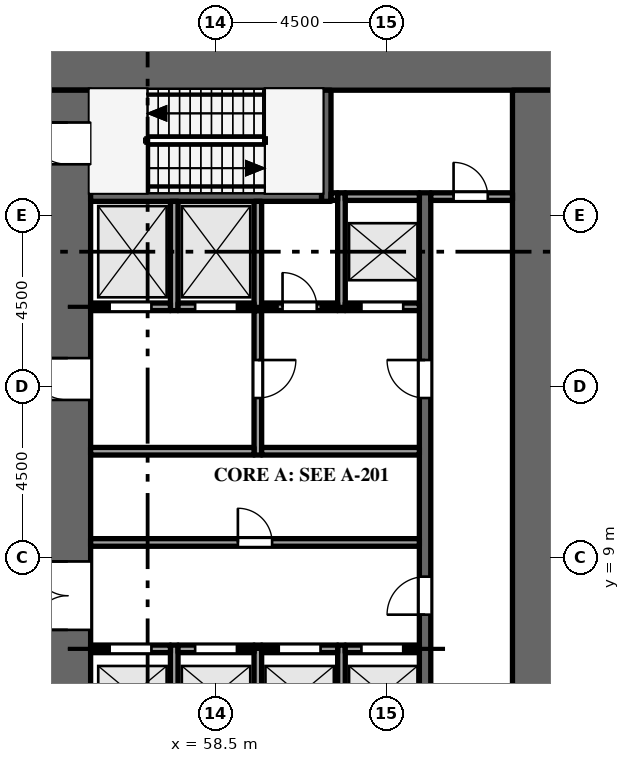
"""IFC4 building model, lengths in metres.
Left out: names, types, materials, properties, quantities, classifications, styles, units other than length and angle.
Written with IfcOpenShell. Run it as: python <this file> out.ifc"""

import sys

from ifc_helpers import new_model, si_unit, direction, frame, frame_2d, origin, place, context, subcontext, project, spatial, rectangle, extrude, element, fill, save


model = new_model("IFC4")
c1 = context("Model", 3, precision=1e-05, world=origin(), true_north=direction((0.0, 1.0)))
c2 = subcontext(c1, "Body", "Model", "MODEL_VIEW")
j1 = project(units=[si_unit("LENGTHUNIT", "METRE"), si_unit("PLANEANGLEUNIT", "RADIAN")], contexts=[c1])
p1 = place(None, origin())
s1 = spatial("IfcSite", under=j1, at=p1, CompositionType="ELEMENT")
p2 = place(p1, origin())
s2 = spatial("IfcBuilding", under=s1, at=p2, CompositionType="ELEMENT")
p3 = place(p2, origin())
s3 = spatial("IfcBuildingStorey", under=s2, at=p3, CompositionType="ELEMENT", Elevation=0.0)
p4 = place(p3, frame((54.0, 21.9, -0.3), z_axis=(0.0, 0.0, 1.0), x_axis=(1.0, 0.0, 0.0)))
e1 = element("IfcWall", 1, at=p4, inside=s3, PredefinedType="SHEAR", context=c2, shape_type="SweptSolid", body=[
    extrude(rectangle(XDim=13.5, YDim=1.2, at=frame_2d((6.75, 0.0))), origin(), (0.0, 0.0, 1.0), 8.15),
])
p5 = place(p3, frame((54.6, 1.2, -0.3), z_axis=(0.0, 0.0, 1.0), x_axis=(0.0, 1.0, 0.0)))
e2 = element("IfcWall", 2, at=p5, inside=s3, PredefinedType="SHEAR", context=c2, shape_type="SweptSolid", body=[
    extrude(rectangle(XDim=20.1, YDim=1.2, at=frame_2d((10.05, 0.0))), origin(), (0.0, 0.0, 1.0), 8.15),
])
p6 = place(p5, frame((5.9, 0.0, 0.3)))
e3 = element("IfcOpeningElement", 3, at=p6, cuts=e2, PredefinedType="OPENING", context=c2, shape_type="SweptSolid", body=[
    extrude(rectangle(XDim=1.8, YDim=2.1, at=frame_2d((0.9, 1.05))), frame((0.0, 0.61, 0.0), z_axis=(0.0, -1.0, 0.0), x_axis=(1.0, 0.0, 0.0)), (0.0, 0.0, 1.0), 1.22),
])
p7 = place(p5, frame((11.95, 0.0, 0.3)))
e4 = element("IfcOpeningElement", 4, at=p7, cuts=e2, PredefinedType="OPENING", context=c2, shape_type="SweptSolid", body=[
    extrude(rectangle(XDim=1.1, YDim=2.1, at=frame_2d((0.55, 1.05))), frame((0.0, 0.61, 0.0), z_axis=(0.0, -1.0, 0.0), x_axis=(1.0, 0.0, 0.0)), (0.0, 0.0, 1.0), 1.22),
])
p8 = place(p5, frame((0.95, 0.0, 0.3)))
e5 = element("IfcOpeningElement", 5, at=p8, cuts=e2, PredefinedType="OPENING", context=c2, shape_type="SweptSolid", body=[
    extrude(rectangle(XDim=1.1, YDim=2.1, at=frame_2d((0.55, 1.05))), frame((0.0, 0.61, 0.0), z_axis=(0.0, -1.0, 0.0), x_axis=(1.0, 0.0, 0.0)), (0.0, 0.0, 1.0), 1.22),
])
p9 = place(p5, frame((18.15, 0.0, 0.3)))
e6 = element("IfcOpeningElement", 6, at=p9, cuts=e2, PredefinedType="OPENING", context=c2, shape_type="SweptSolid", body=[
    extrude(rectangle(XDim=1.1, YDim=2.1, at=frame_2d((0.55, 1.05))), frame((0.0, 0.61, 0.0), z_axis=(0.0, -1.0, 0.0), x_axis=(1.0, 0.0, 0.0)), (0.0, 0.0, 1.0), 1.22),
])
p10 = place(p3, frame((66.9, 1.2, -0.3), z_axis=(0.0, 0.0, 1.0), x_axis=(0.0, 1.0, 0.0)))
e7 = element("IfcWall", 7, at=p10, inside=s3, PredefinedType="SHEAR", context=c2, shape_type="SweptSolid", body=[
    extrude(rectangle(XDim=20.1, YDim=1.2, at=frame_2d((10.05, 0.0))), origin(), (0.0, 0.0, 1.0), 8.15),
])
p11 = place(p3, frame((57.4, 4.325, 0.0), z_axis=(0.0, 0.0, 1.0), x_axis=(0.0, 1.0, 0.0)))
e8 = element("IfcWall", 8, at=p11, inside=s3, PredefinedType="SOLIDWALL", context=c2, shape_type="SweptSolid", body=[
    extrude(rectangle(XDim=2.375, YDim=0.2, at=frame_2d((1.188, 0.0))), origin(), (0.0, 0.0, 1.0), 7.75),
])
p12 = place(p3, frame((57.4, 15.5, 0.0), z_axis=(0.0, 0.0, 1.0), x_axis=(0.0, 1.0, 0.0)))
e9 = element("IfcWall", 9, at=p12, inside=s3, PredefinedType="SOLIDWALL", context=c2, shape_type="SweptSolid", body=[
    extrude(rectangle(XDim=2.875, YDim=0.2, at=frame_2d((1.438, 0.0))), origin(), (0.0, 0.0, 1.0), 7.75),
])
p13 = place(p3, frame((59.6, 4.325, 0.0), z_axis=(0.0, 0.0, 1.0), x_axis=(0.0, 1.0, 0.0)))
e10 = element("IfcWall", 10, at=p13, inside=s3, PredefinedType="SOLIDWALL", context=c2, shape_type="SweptSolid", body=[
    extrude(rectangle(XDim=2.375, YDim=0.2, at=frame_2d((1.188, 0.0))), origin(), (0.0, 0.0, 1.0), 7.75),
])
p14 = place(p3, frame((59.6, 11.7, 0.0), z_axis=(0.0, 0.0, 1.0), x_axis=(0.0, 1.0, 0.0)))
e11 = element("IfcWall", 11, at=p14, inside=s3, PredefinedType="PARTITIONING", context=c2, shape_type="SweptSolid", body=[
    extrude(rectangle(XDim=3.8, YDim=0.2, at=frame_2d((1.9, 0.0))), origin(), (0.0, 0.0, 1.0), 7.75),
])
p15 = place(p14, frame((1.5, 0.0, 0.0)))
e12 = element("IfcOpeningElement", 12, at=p15, cuts=e11, PredefinedType="OPENING", context=c2, shape_type="SweptSolid", body=[
    extrude(rectangle(XDim=1.0, YDim=2.1, at=frame_2d((0.5, 1.05))), frame((0.0, 0.11, 0.0), z_axis=(0.0, -1.0, 0.0), x_axis=(1.0, 0.0, 0.0)), (0.0, 0.0, 1.0), 0.22),
])
p16 = place(p3, frame((59.6, 15.5, 0.0), z_axis=(0.0, 0.0, 1.0), x_axis=(0.0, 1.0, 0.0)))
e13 = element("IfcWall", 13, at=p16, inside=s3, PredefinedType="SOLIDWALL", context=c2, shape_type="SweptSolid", body=[
    extrude(rectangle(XDim=2.875, YDim=0.2, at=frame_2d((1.438, 0.0))), origin(), (0.0, 0.0, 1.0), 7.75),
])
p17 = place(p3, frame((61.4, 18.375, 0.0), z_axis=(0.0, 0.0, 1.0), x_axis=(0.0, 1.0, 0.0)))
e14 = element("IfcWall", 14, at=p17, inside=s3, PredefinedType="SHEAR", context=c2, shape_type="SweptSolid", body=[
    extrude(rectangle(XDim=2.925, YDim=0.25, at=frame_2d((1.462, 0.0))), origin(), (0.0, 0.0, 1.0), 7.75),
])
p18 = place(p3, frame((61.8, 4.1, 0.0), z_axis=(0.0, 0.0, 1.0), x_axis=(0.0, 1.0, 0.0)))
e15 = element("IfcWall", 15, at=p18, inside=s3, PredefinedType="SOLIDWALL", context=c2, shape_type="SweptSolid", body=[
    extrude(rectangle(XDim=2.6, YDim=0.2, at=frame_2d((1.3, 0.0))), origin(), (0.0, 0.0, 1.0), 7.75),
])
p19 = place(p3, frame((61.8, 15.5, 0.0), z_axis=(0.0, 0.0, 1.0), x_axis=(0.0, 1.0, 0.0)))
e16 = element("IfcWall", 16, at=p19, inside=s3, PredefinedType="SOLIDWALL", context=c2, shape_type="SweptSolid", body=[
    extrude(rectangle(XDim=3.1, YDim=0.2, at=frame_2d((1.55, 0.0))), origin(), (0.0, 0.0, 1.0), 7.75),
])
p20 = place(p3, frame((64.0, 4.1, 0.0), z_axis=(0.0, 0.0, 1.0), x_axis=(0.0, 1.0, 0.0)))
e17 = element("IfcWall", 17, at=p20, inside=s3, PredefinedType="SHEAR", context=c2, shape_type="SweptSolid", body=[
    extrude(rectangle(XDim=14.5, YDim=0.3, at=frame_2d((7.25, 0.0))), origin(), (0.0, 0.0, 1.0), 7.75),
])
p21 = place(p20, frame((3.4, 0.0, 0.0)))
e18 = element("IfcOpeningElement", 18, at=p21, cuts=e17, PredefinedType="OPENING", context=c2, shape_type="SweptSolid", body=[
    extrude(rectangle(XDim=1.0, YDim=2.1, at=frame_2d((0.5, 1.05))), frame((0.0, 0.16, 0.0), z_axis=(0.0, -1.0, 0.0), x_axis=(1.0, 0.0, 0.0)), (0.0, 0.0, 1.0), 0.32),
])
p22 = place(p20, frame((9.1, 0.0, 0.0)))
e19 = element("IfcOpeningElement", 19, at=p22, cuts=e17, PredefinedType="OPENING", context=c2, shape_type="SweptSolid", body=[
    extrude(rectangle(XDim=1.0, YDim=2.1, at=frame_2d((0.5, 1.05))), frame((0.0, 0.16, 0.0), z_axis=(0.0, -1.0, 0.0), x_axis=(1.0, 0.0, 0.0)), (0.0, 0.0, 1.0), 0.32),
])
p23 = place(p3, frame((55.2, 6.6, 0.0), z_axis=(0.0, 0.0, 1.0), x_axis=(1.0, 0.0, 0.0)))
e20 = element("IfcWall", 20, at=p23, inside=s3, PredefinedType="SOLIDWALL", context=c2, shape_type="SweptSolid", body=[
    extrude(rectangle(XDim=2.1, YDim=0.2, at=frame_2d((1.05, 0.0))), origin(), (0.0, 0.0, 1.0), 7.75),
])
p24 = place(p23, frame((0.5, 0.0, 0.012)))
e21 = element("IfcOpeningElement", 21, at=p24, cuts=e20, PredefinedType="OPENING", context=c2, shape_type="SweptSolid", body=[
    extrude(rectangle(XDim=1.1, YDim=2.1, at=frame_2d((0.55, 1.05))), frame((0.0, 0.11, 0.0), z_axis=(0.0, -1.0, 0.0), x_axis=(1.0, 0.0, 0.0)), (0.0, 0.0, 1.0), 0.22),
])
p25 = place(p3, frame((57.5, 6.6, 0.0), z_axis=(0.0, 0.0, 1.0), x_axis=(1.0, 0.0, 0.0)))
e22 = element("IfcWall", 22, at=p25, inside=s3, PredefinedType="SOLIDWALL", context=c2, shape_type="SweptSolid", body=[
    extrude(rectangle(XDim=2.0, YDim=0.2, at=frame_2d((1.0, 0.0))), origin(), (0.0, 0.0, 1.0), 7.75),
])
p26 = place(p25, frame((0.45, 0.0, 0.012)))
e23 = element("IfcOpeningElement", 23, at=p26, cuts=e22, PredefinedType="OPENING", context=c2, shape_type="SweptSolid", body=[
    extrude(rectangle(XDim=1.1, YDim=2.1, at=frame_2d((0.55, 1.05))), frame((0.0, 0.11, 0.0), z_axis=(0.0, -1.0, 0.0), x_axis=(1.0, 0.0, 0.0)), (0.0, 0.0, 1.0), 0.22),
])
p27 = place(p3, frame((59.7, 6.6, 0.0), z_axis=(0.0, 0.0, 1.0), x_axis=(1.0, 0.0, 0.0)))
e24 = element("IfcWall", 24, at=p27, inside=s3, PredefinedType="SOLIDWALL", context=c2, shape_type="SweptSolid", body=[
    extrude(rectangle(XDim=2.0, YDim=0.2, at=frame_2d((1.0, 0.0))), origin(), (0.0, 0.0, 1.0), 7.75),
])
p28 = place(p27, frame((0.45, 0.0, 0.012)))
e25 = element("IfcOpeningElement", 25, at=p28, cuts=e24, PredefinedType="OPENING", context=c2, shape_type="SweptSolid", body=[
    extrude(rectangle(XDim=1.1, YDim=2.1, at=frame_2d((0.55, 1.05))), frame((0.0, 0.11, 0.0), z_axis=(0.0, -1.0, 0.0), x_axis=(1.0, 0.0, 0.0)), (0.0, 0.0, 1.0), 0.22),
])
p29 = place(p3, frame((61.9, 6.6, 0.0), z_axis=(0.0, 0.0, 1.0), x_axis=(1.0, 0.0, 0.0)))
e26 = element("IfcWall", 26, at=p29, inside=s3, PredefinedType="SOLIDWALL", context=c2, shape_type="SweptSolid", body=[
    extrude(rectangle(XDim=1.95, YDim=0.2, at=frame_2d((0.975, 0.0))), origin(), (0.0, 0.0, 1.0), 7.75),
])
p30 = place(p29, frame((0.425, 0.0, 0.012)))
e27 = element("IfcOpeningElement", 27, at=p30, cuts=e26, PredefinedType="OPENING", context=c2, shape_type="SweptSolid", body=[
    extrude(rectangle(XDim=1.1, YDim=2.1, at=frame_2d((0.55, 1.05))), frame((0.0, 0.11, 0.0), z_axis=(0.0, -1.0, 0.0), x_axis=(1.0, 0.0, 0.0)), (0.0, 0.0, 1.0), 0.22),
])
p31 = place(p3, frame((55.2, 9.4, 0.0), z_axis=(0.0, 0.0, 1.0), x_axis=(1.0, 0.0, 0.0)))
e28 = element("IfcWall", 28, at=p31, inside=s3, PredefinedType="PARTITIONING", context=c2, shape_type="SweptSolid", body=[
    extrude(rectangle(XDim=8.65, YDim=0.2, at=frame_2d((4.325, 0.0))), origin(), (0.0, 0.0, 1.0), 7.75),
])
p32 = place(p31, frame((3.875, 0.0, 0.0)))
e29 = element("IfcOpeningElement", 29, at=p32, cuts=e28, PredefinedType="OPENING", context=c2, shape_type="SweptSolid", body=[
    extrude(rectangle(XDim=0.9, YDim=2.1, at=frame_2d((0.45, 1.05))), frame((0.0, 0.11, 0.0), z_axis=(0.0, -1.0, 0.0), x_axis=(1.0, 0.0, 0.0)), (0.0, 0.0, 1.0), 0.22),
])
p33 = place(p3, frame((55.2, 11.8, 0.0), z_axis=(0.0, 0.0, 1.0), x_axis=(1.0, 0.0, 0.0)))
e30 = element("IfcWall", 30, at=p33, inside=s3, PredefinedType="PARTITIONING", context=c2, shape_type="SweptSolid", body=[
    extrude(rectangle(XDim=4.3, YDim=0.2, at=frame_2d((2.15, 0.0))), origin(), (0.0, 0.0, 1.0), 7.75),
])
p34 = place(p3, frame((59.7, 11.8, 0.0), z_axis=(0.0, 0.0, 1.0), x_axis=(1.0, 0.0, 0.0)))
e31 = element("IfcWall", 31, at=p34, inside=s3, PredefinedType="PARTITIONING", context=c2, shape_type="SweptSolid", body=[
    extrude(rectangle(XDim=4.15, YDim=0.2, at=frame_2d((2.075, 0.0))), origin(), (0.0, 0.0, 1.0), 7.75),
])
p35 = place(p3, frame((55.2, 15.6, 0.0), z_axis=(0.0, 0.0, 1.0), x_axis=(1.0, 0.0, 0.0)))
e32 = element("IfcWall", 32, at=p35, inside=s3, PredefinedType="SOLIDWALL", context=c2, shape_type="SweptSolid", body=[
    extrude(rectangle(XDim=2.1, YDim=0.2, at=frame_2d((1.05, 0.0))), origin(), (0.0, 0.0, 1.0), 7.75),
])
p36 = place(p35, frame((0.5, 0.0, 0.012)))
e33 = element("IfcOpeningElement", 33, at=p36, cuts=e32, PredefinedType="OPENING", context=c2, shape_type="SweptSolid", body=[
    extrude(rectangle(XDim=1.1, YDim=2.1, at=frame_2d((0.55, 1.05))), frame((0.0, 0.11, 0.0), z_axis=(0.0, -1.0, 0.0), x_axis=(1.0, 0.0, 0.0)), (0.0, 0.0, 1.0), 0.22),
])
p37 = place(p3, frame((57.5, 15.6, 0.0), z_axis=(0.0, 0.0, 1.0), x_axis=(1.0, 0.0, 0.0)))
e34 = element("IfcWall", 34, at=p37, inside=s3, PredefinedType="SOLIDWALL", context=c2, shape_type="SweptSolid", body=[
    extrude(rectangle(XDim=2.0, YDim=0.2, at=frame_2d((1.0, 0.0))), origin(), (0.0, 0.0, 1.0), 7.75),
])
p38 = place(p37, frame((0.45, 0.0, 0.012)))
e35 = element("IfcOpeningElement", 35, at=p38, cuts=e34, PredefinedType="OPENING", context=c2, shape_type="SweptSolid", body=[
    extrude(rectangle(XDim=1.1, YDim=2.1, at=frame_2d((0.55, 1.05))), frame((0.0, 0.11, 0.0), z_axis=(0.0, -1.0, 0.0), x_axis=(1.0, 0.0, 0.0)), (0.0, 0.0, 1.0), 0.22),
])
p39 = place(p3, frame((59.7, 15.6, 0.0), z_axis=(0.0, 0.0, 1.0), x_axis=(1.0, 0.0, 0.0)))
e36 = element("IfcWall", 36, at=p39, inside=s3, PredefinedType="PARTITIONING", context=c2, shape_type="SweptSolid", body=[
    extrude(rectangle(XDim=2.0, YDim=0.2, at=frame_2d((1.0, 0.0))), origin(), (0.0, 0.0, 1.0), 7.75),
])
p40 = place(p39, frame((0.55, 0.0, 0.0)))
e37 = element("IfcOpeningElement", 37, at=p40, cuts=e36, PredefinedType="OPENING", context=c2, shape_type="SweptSolid", body=[
    extrude(rectangle(XDim=0.9, YDim=2.1, at=frame_2d((0.45, 1.05))), frame((0.0, 0.11, 0.0), z_axis=(0.0, -1.0, 0.0), x_axis=(1.0, 0.0, 0.0)), (0.0, 0.0, 1.0), 0.22),
])
p41 = place(p3, frame((61.9, 15.6, 0.0), z_axis=(0.0, 0.0, 1.0), x_axis=(1.0, 0.0, 0.0)))
e38 = element("IfcWall", 38, at=p41, inside=s3, PredefinedType="SOLIDWALL", context=c2, shape_type="SweptSolid", body=[
    extrude(rectangle(XDim=1.95, YDim=0.2, at=frame_2d((0.975, 0.0))), origin(), (0.0, 0.0, 1.0), 7.75),
])
p42 = place(p41, frame((0.425, 0.0, 0.012)))
e39 = element("IfcOpeningElement", 39, at=p42, cuts=e38, PredefinedType="OPENING", context=c2, shape_type="SweptSolid", body=[
    extrude(rectangle(XDim=1.1, YDim=2.1, at=frame_2d((0.55, 1.05))), frame((0.0, 0.11, 0.0), z_axis=(0.0, -1.0, 0.0), x_axis=(1.0, 0.0, 0.0)), (0.0, 0.0, 1.0), 0.22),
])
p43 = place(p3, frame((55.2, 18.5, 0.0), z_axis=(0.0, 0.0, 1.0), x_axis=(1.0, 0.0, 0.0)))
e40 = element("IfcWall", 40, at=p43, inside=s3, PredefinedType="SHEAR", context=c2, shape_type="SweptSolid", body=[
    extrude(rectangle(XDim=6.075, YDim=0.25, at=frame_2d((3.038, 0.0))), origin(), (0.0, 0.0, 1.0), 7.75),
])
p44 = place(p3, frame((61.525, 18.5, 0.0), z_axis=(0.0, 0.0, 1.0), x_axis=(1.0, 0.0, 0.0)))
e41 = element("IfcWall", 41, at=p44, inside=s3, PredefinedType="PARTITIONING", context=c2, shape_type="SweptSolid", body=[
    extrude(rectangle(XDim=0.175, YDim=0.2, at=frame_2d((0.087, 0.0))), origin(), (0.0, 0.0, 1.0), 7.75),
])
p45 = place(p3, frame((61.9, 18.5, 0.0), z_axis=(0.0, 0.0, 1.0), x_axis=(1.0, 0.0, 0.0)))
e42 = element("IfcWall", 42, at=p45, inside=s3, PredefinedType="SOLIDWALL", context=c2, shape_type="SweptSolid", body=[
    extrude(rectangle(XDim=1.95, YDim=0.2, at=frame_2d((0.975, 0.0))), origin(), (0.0, 0.0, 1.0), 7.75),
])
p46 = place(p3, frame((64.15, 18.5, 0.0), z_axis=(0.0, 0.0, 1.0), x_axis=(1.0, 0.0, 0.0)))
e43 = element("IfcWall", 43, at=p46, inside=s3, PredefinedType="PARTITIONING", context=c2, shape_type="SweptSolid", body=[
    extrude(rectangle(XDim=2.15, YDim=0.2, at=frame_2d((1.075, 0.0))), origin(), (0.0, 0.0, 1.0), 7.75),
])
p47 = place(p46, frame((0.6, 0.0, 0.0)))
e44 = element("IfcOpeningElement", 44, at=p47, cuts=e43, PredefinedType="OPENING", context=c2, shape_type="SweptSolid", body=[
    extrude(rectangle(XDim=0.9, YDim=2.1, at=frame_2d((0.45, 1.05))), frame((0.0, 0.11, 0.0), z_axis=(0.0, -1.0, 0.0), x_axis=(1.0, 0.0, 0.0)), (0.0, 0.0, 1.0), 0.22),
])
p48 = place(p24, origin())
e45 = element("IfcDoor", 45, at=p48, inside=s3, OperationType="SLIDING_TO_LEFT", PredefinedType="DOOR", context=c2, shape_type="SweptSolid", body=[
    extrude(rectangle(XDim=1.1, YDim=2.1, at=frame_2d((0.55, 1.05))), frame((0.0, 0.025, 0.0), z_axis=(0.0, -1.0, 0.0), x_axis=(1.0, 0.0, 0.0)), (0.0, 0.0, 1.0), 0.05),
])
fill(e21, e45)
p49 = place(p26, origin())
e46 = element("IfcDoor", 46, at=p49, inside=s3, OperationType="SLIDING_TO_RIGHT", PredefinedType="DOOR", context=c2, shape_type="SweptSolid", body=[
    extrude(rectangle(XDim=1.1, YDim=2.1, at=frame_2d((0.55, 1.05))), frame((0.0, 0.025, 0.0), z_axis=(0.0, -1.0, 0.0), x_axis=(1.0, 0.0, 0.0)), (0.0, 0.0, 1.0), 0.05),
])
fill(e23, e46)
p50 = place(p28, origin())
e47 = element("IfcDoor", 47, at=p50, inside=s3, OperationType="SLIDING_TO_LEFT", PredefinedType="DOOR", context=c2, shape_type="SweptSolid", body=[
    extrude(rectangle(XDim=1.1, YDim=2.1, at=frame_2d((0.55, 1.05))), frame((0.0, 0.025, 0.0), z_axis=(0.0, -1.0, 0.0), x_axis=(1.0, 0.0, 0.0)), (0.0, 0.0, 1.0), 0.05),
])
fill(e25, e47)
p51 = place(p30, origin())
e48 = element("IfcDoor", 48, at=p51, inside=s3, OperationType="SLIDING_TO_RIGHT", PredefinedType="DOOR", context=c2, shape_type="SweptSolid", body=[
    extrude(rectangle(XDim=1.1, YDim=2.1, at=frame_2d((0.55, 1.05))), frame((0.0, 0.025, 0.0), z_axis=(0.0, -1.0, 0.0), x_axis=(1.0, 0.0, 0.0)), (0.0, 0.0, 1.0), 0.05),
])
fill(e27, e48)
p52 = place(p36, origin())
e49 = element("IfcDoor", 49, at=p52, inside=s3, OperationType="SLIDING_TO_LEFT", PredefinedType="DOOR", context=c2, shape_type="SweptSolid", body=[
    extrude(rectangle(XDim=1.1, YDim=2.1, at=frame_2d((0.55, 1.05))), frame((0.0, 0.025, 0.0), z_axis=(0.0, -1.0, 0.0), x_axis=(1.0, 0.0, 0.0)), (0.0, 0.0, 1.0), 0.05),
])
fill(e33, e49)
p53 = place(p38, origin())
e50 = element("IfcDoor", 50, at=p53, inside=s3, OperationType="SLIDING_TO_RIGHT", PredefinedType="DOOR", context=c2, shape_type="SweptSolid", body=[
    extrude(rectangle(XDim=1.1, YDim=2.1, at=frame_2d((0.55, 1.05))), frame((0.0, 0.025, 0.0), z_axis=(0.0, -1.0, 0.0), x_axis=(1.0, 0.0, 0.0)), (0.0, 0.0, 1.0), 0.05),
])
fill(e35, e50)
p54 = place(p42, origin())
e51 = element("IfcDoor", 51, at=p54, inside=s3, OperationType="SLIDING_TO_LEFT", PredefinedType="DOOR", context=c2, shape_type="SweptSolid", body=[
    extrude(rectangle(XDim=1.1, YDim=2.1, at=frame_2d((0.55, 1.05))), frame((0.0, 0.025, 0.0), z_axis=(0.0, -1.0, 0.0), x_axis=(1.0, 0.0, 0.0)), (0.0, 0.0, 1.0), 0.05),
])
fill(e39, e51)
p55 = place(p6, origin())
e52 = element("IfcDoor", 52, at=p55, inside=s3, OperationType="DOUBLE_DOOR_SINGLE_SWING", PredefinedType="DOOR", context=c2, shape_type="SweptSolid", body=[
    extrude(rectangle(XDim=1.8, YDim=2.1, at=frame_2d((0.9, 1.05))), frame((0.0, 0.025, 0.0), z_axis=(0.0, -1.0, 0.0), x_axis=(1.0, 0.0, 0.0)), (0.0, 0.0, 1.0), 0.05),
])
fill(e3, e52)
p56 = place(p21, origin())
e53 = element("IfcDoor", 53, at=p56, inside=s3, OperationType="SINGLE_SWING_LEFT", PredefinedType="DOOR", context=c2, shape_type="SweptSolid", body=[
    extrude(rectangle(XDim=1.0, YDim=2.1, at=frame_2d((0.5, 1.05))), frame((0.0, 0.025, 0.0), z_axis=(0.0, -1.0, 0.0), x_axis=(1.0, 0.0, 0.0)), (0.0, 0.0, 1.0), 0.05),
])
fill(e18, e53)
p57 = place(p7, origin())
e54 = element("IfcDoor", 54, at=p57, inside=s3, OperationType="SINGLE_SWING_RIGHT", PredefinedType="DOOR", context=c2, shape_type="SweptSolid", body=[
    extrude(rectangle(XDim=1.1, YDim=2.1, at=frame_2d((0.55, 1.05))), frame((0.0, 0.025, 0.0), z_axis=(0.0, -1.0, 0.0), x_axis=(1.0, 0.0, 0.0)), (0.0, 0.0, 1.0), 0.05),
])
fill(e4, e54)
p58 = place(p15, origin())
e55 = element("IfcDoor", 55, at=p58, inside=s3, OperationType="SINGLE_SWING_RIGHT", PredefinedType="DOOR", context=c2, shape_type="SweptSolid", body=[
    extrude(rectangle(XDim=1.0, YDim=2.1, at=frame_2d((0.5, 1.05))), frame((0.0, 0.025, 0.0), z_axis=(0.0, -1.0, 0.0), x_axis=(1.0, 0.0, 0.0)), (0.0, 0.0, 1.0), 0.05),
])
fill(e12, e55)
p59 = place(p22, origin())
e56 = element("IfcDoor", 56, at=p59, inside=s3, OperationType="SINGLE_SWING_RIGHT", PredefinedType="DOOR", context=c2, shape_type="SweptSolid", body=[
    extrude(rectangle(XDim=1.0, YDim=2.1, at=frame_2d((0.5, 1.05))), frame((0.0, 0.025, 0.0), z_axis=(0.0, -1.0, 0.0), x_axis=(1.0, 0.0, 0.0)), (0.0, 0.0, 1.0), 0.05),
])
fill(e19, e56)
p60 = place(p9, origin())
e57 = element("IfcDoor", 57, at=p60, inside=s3, OperationType="SINGLE_SWING_RIGHT", PredefinedType="DOOR", context=c2, shape_type="SweptSolid", body=[
    extrude(rectangle(XDim=1.1, YDim=2.1, at=frame_2d((0.55, 1.05))), frame((0.0, 0.025, 0.0), z_axis=(0.0, -1.0, 0.0), x_axis=(1.0, 0.0, 0.0)), (0.0, 0.0, 1.0), 0.05),
])
fill(e6, e57)
p61 = place(p47, origin())
e58 = element("IfcDoor", 58, at=p61, inside=s3, OperationType="SINGLE_SWING_LEFT", PredefinedType="DOOR", context=c2, shape_type="SweptSolid", body=[
    extrude(rectangle(XDim=0.9, YDim=2.1, at=frame_2d((0.45, 1.05))), frame((0.0, 0.025, 0.0), z_axis=(0.0, -1.0, 0.0), x_axis=(1.0, 0.0, 0.0)), (0.0, 0.0, 1.0), 0.05),
])
fill(e44, e58)
p62 = place(p32, origin())
e59 = element("IfcDoor", 59, at=p62, inside=s3, OperationType="SINGLE_SWING_LEFT", PredefinedType="DOOR", context=c2, shape_type="SweptSolid", body=[
    extrude(rectangle(XDim=0.9, YDim=2.1, at=frame_2d((0.45, 1.05))), frame((0.0, 0.025, 0.0), z_axis=(0.0, -1.0, 0.0), x_axis=(1.0, 0.0, 0.0)), (0.0, 0.0, 1.0), 0.05),
])
fill(e29, e59)
p63 = place(p40, origin())
e60 = element("IfcDoor", 60, at=p63, inside=s3, OperationType="SINGLE_SWING_LEFT", PredefinedType="DOOR", context=c2, shape_type="SweptSolid", body=[
    extrude(rectangle(XDim=0.9, YDim=2.1, at=frame_2d((0.45, 1.05))), frame((0.0, 0.025, 0.0), z_axis=(0.0, -1.0, 0.0), x_axis=(1.0, 0.0, 0.0)), (0.0, 0.0, 1.0), 0.05),
])
fill(e37, e60)
save(model, sys.argv[1])
